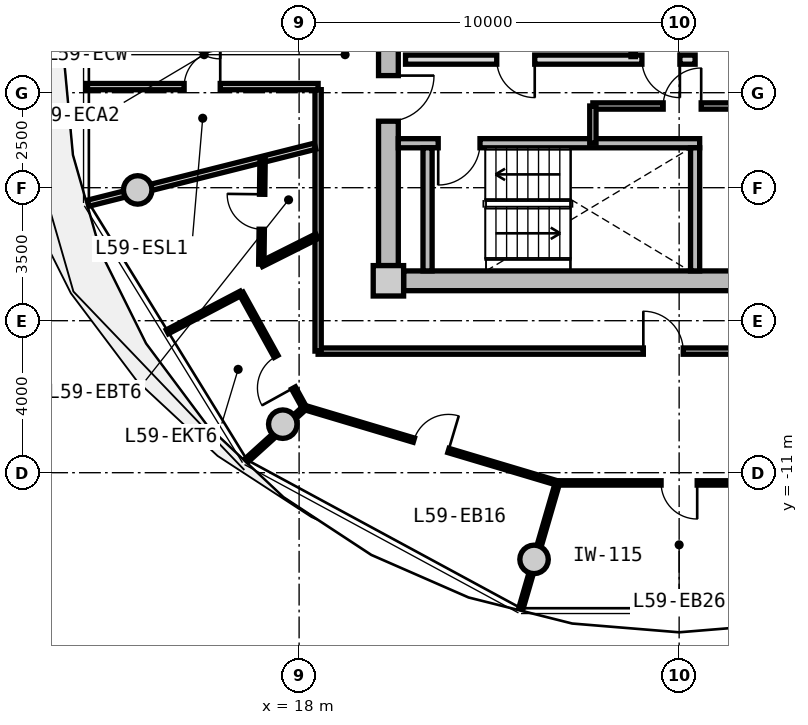
"""IFC4 building model, lengths in metres.
Left out: names, types, materials, properties, quantities, classifications, styles, units other than length and angle.
Written with IfcOpenShell. Run it as: python <this file> out.ifc"""

import sys

from ifc_helpers import new_model, si_unit, direction, frame, frame_2d, origin, origin_2d, place, context, subcontext, project, spatial, rectangle, circle, extrude, source, transform, mapped, element, fill, save


model = new_model("IFC4")
c1 = context("Model", 3, precision=1e-05, world=origin(), true_north=direction((0.0, 1.0)))
c2 = subcontext(c1, "Body", "Model", "MODEL_VIEW")
j1 = project(units=[si_unit("LENGTHUNIT", "METRE"), si_unit("PLANEANGLEUNIT", "RADIAN")], contexts=[c1])
p1 = place(None, origin())
s1 = spatial("IfcSite", under=j1, at=p1, CompositionType="ELEMENT")
p2 = place(p1, origin())
s2 = spatial("IfcBuilding", under=s1, at=p2, CompositionType="ELEMENT")
p3 = place(p2, frame((0.0, 0.0, 190.65)))
s3 = spatial("IfcBuildingStorey", under=s2, at=p3, CompositionType="ELEMENT", Elevation=190.65)
m1 = source(origin(), c2, "Body", "SweptSolid", [
    extrude(rectangle(XDim=0.8, YDim=0.8, at=origin_2d()), origin(), (0.0, 0.0, 1.0), 3.05),
])
p4 = place(p3, frame((20.35, -5.95, 0.0), z_axis=(0.0, 0.0, 1.0), x_axis=(1.0, 0.0, 0.0)))
e1 = element("IfcColumn", 1, at=p4, inside=s3, PredefinedType="COLUMN", context=c2, shape_type="MappedRepresentation", body=[
    mapped(m1, transform((0.0, 0.0, 0.0), x_axis=(1.0, 0.0, 0.0), y_axis=(0.0, 1.0, 0.0), z_axis=(0.0, 0.0, 1.0), scale=1.0)),
])
m2 = source(origin(), c2, "Body", "SweptSolid", [
    extrude(rectangle(XDim=14.5, YDim=0.52, at=frame_2d((7.25, 0.0))), origin(), (0.0, 0.0, 1.0), 2.81),
])
p5 = place(p3, frame((35.25, -5.95, 0.0), z_axis=(0.0, 0.0, 1.0), x_axis=(-1.0, 0.0, 0.0)))
e2 = element("IfcWall", 2, at=p5, inside=s3, PredefinedType="SHEAR", context=c2, shape_type="MappedRepresentation", body=[
    mapped(m2, transform((0.0, 0.0, 0.0), x_axis=(1.0, 0.0, 0.0), y_axis=(0.0, 1.0, 0.0), z_axis=(0.0, 0.0, 1.0), scale=1.0)),
])
m3 = source(origin(), c2, "Body", "SweptSolid", [
    extrude(rectangle(XDim=11.1, YDim=0.52, at=frame_2d((5.55, 0.0))), origin(), (0.0, 0.0, 1.0), 2.81),
])
p6 = place(p3, frame((20.35, -5.55, 0.0), z_axis=(0.0, 0.0, 1.0), x_axis=(0.0, 1.0, 0.0)))
e3 = element("IfcWall", 3, at=p6, inside=s3, PredefinedType="SHEAR", context=c2, shape_type="MappedRepresentation", body=[
    mapped(m3, transform((0.0, 0.0, 0.0), x_axis=(1.0, 0.0, 0.0), y_axis=(0.0, 1.0, 0.0), z_axis=(0.0, 0.0, 1.0), scale=1.0)),
])
p7 = place(p6, frame((3.8, 0.0, 0.0)))
e4 = element("IfcOpeningElement", 4, at=p7, cuts=e3, PredefinedType="OPENING", context=c2, shape_type="SweptSolid", body=[
    extrude(rectangle(XDim=1.2, YDim=2.15, at=frame_2d((0.6, 1.075))), frame((0.0, 0.27, 0.0), z_axis=(0.0, -1.0, 0.0), x_axis=(1.0, 0.0, 0.0)), (0.0, 0.0, 1.0), 0.54),
])
m4 = source(origin(), c2, "Body", "SweptSolid", [
    extrude(circle(Radius=0.375, at=origin_2d()), origin(), (0.0, 0.0, 1.0), 3.47),
])
for number, where, z_axis, x_axis in (
    (5, (13.753, -3.559, -0.42), (0.0, 0.0, 1.0), (1.0, 0.0, 0.0)),
    (6, (17.57, -9.723, -0.42), (0.0, 0.0, 1.0), (1.0, 0.0, 0.0)),
    (7, (24.182, -13.281, -0.42), (0.0, 0.0, 1.0), (1.0, 0.0, 0.0)),
):
    element("IfcColumn", number, at=place(p3, frame(where, z_axis=z_axis, x_axis=x_axis)), inside=s3, PredefinedType="COLUMN", context=c2, shape_type="MappedRepresentation", body=[
        mapped(m4, transform((0.0, 0.0, 0.0), x_axis=(1.0, 0.0, 0.0), y_axis=(0.0, 1.0, 0.0), z_axis=(0.0, 0.0, 1.0), scale=1.0)),
    ])
m5 = source(origin(), c2, "Body", "SweptSolid", [
    extrude(rectangle(XDim=7.93, YDim=0.24, at=frame_2d((3.965, 0.0))), origin(), (0.0, 0.0, 1.0), 2.81),
])
p8 = place(p3, frame((20.61, -2.33, 0.0), z_axis=(0.0, 0.0, 1.0), x_axis=(1.0, 0.0, 0.0)))
e8 = element("IfcWall", 8, at=p8, inside=s3, PredefinedType="PARTITIONING", context=c2, shape_type="MappedRepresentation", body=[
    mapped(m5, transform((0.0, 0.0, 0.0), x_axis=(1.0, 0.0, 0.0), y_axis=(0.0, 1.0, 0.0), z_axis=(0.0, 0.0, 1.0), scale=1.0)),
])
p9 = place(p8, frame((1.05, 0.0, 0.0)))
e9 = element("IfcOpeningElement", 9, at=p9, cuts=e8, PredefinedType="OPENING", context=c2, shape_type="SweptSolid", body=[
    extrude(rectangle(XDim=1.1, YDim=2.15, at=frame_2d((0.55, 1.075))), frame((0.0, 0.13, 0.0), z_axis=(0.0, -1.0, 0.0), x_axis=(1.0, 0.0, 0.0)), (0.0, 0.0, 1.0), 0.26),
])
m6 = source(origin(), c2, "Body", "SweptSolid", [
    extrude(rectangle(XDim=3.24, YDim=0.24, at=frame_2d((1.62, 0.0))), origin(), (0.0, 0.0, 1.0), 2.81),
])
for number, where, z_axis, x_axis in (
    (10, (21.38, -5.69, 0.0), (0.0, 0.0, 1.0), (0.0, 1.0, 0.0)),
    (11, (28.42, -5.69, 0.0), (0.0, 0.0, 1.0), (0.0, 1.0, 0.0)),
):
    element("IfcWall", number, at=place(p3, frame(where, z_axis=z_axis, x_axis=x_axis)), inside=s3, PredefinedType="PARTITIONING", context=c2, shape_type="MappedRepresentation", body=[
        mapped(m6, transform((0.0, 0.0, 0.0), x_axis=(1.0, 0.0, 0.0), y_axis=(0.0, 1.0, 0.0), z_axis=(0.0, 0.0, 1.0), scale=1.0)),
    ])
m7 = source(origin(), c2, "Body", "SweptSolid", [
    extrude(rectangle(XDim=7.62, YDim=0.24, at=frame_2d((3.81, 0.0))), origin(), (0.0, 0.0, 1.0), 2.795),
])
p10 = place(p3, frame((20.8, -0.13, 0.0), z_axis=(0.0, 0.0, 1.0), x_axis=(1.0, 0.0, 0.0)))
e12 = element("IfcWall", 12, at=p10, inside=s3, PredefinedType="PARTITIONING", context=c2, shape_type="MappedRepresentation", body=[
    mapped(m7, transform((0.0, 0.0, 0.0), x_axis=(1.0, 0.0, 0.0), y_axis=(0.0, 1.0, 0.0), z_axis=(0.0, 0.0, 1.0), scale=1.0)),
])
p11 = place(p10, frame((6.22, 0.0, 0.0)))
e13 = element("IfcOpeningElement", 13, at=p11, cuts=e12, PredefinedType="OPENING", context=c2, shape_type="SweptSolid", body=[
    extrude(rectangle(XDim=1.0, YDim=2.1, at=frame_2d((0.5, 1.05))), frame((0.0, 0.13, 0.0), z_axis=(0.0, -1.0, 0.0), x_axis=(1.0, 0.0, 0.0)), (0.0, 0.0, 1.0), 0.26),
])
p12 = place(p10, frame((2.4, 0.0, 0.0)))
e14 = element("IfcOpeningElement", 14, at=p12, cuts=e12, PredefinedType="OPENING", context=c2, shape_type="SweptSolid", body=[
    extrude(rectangle(XDim=1.0, YDim=2.1, at=frame_2d((0.5, 1.05))), frame((0.0, 0.13, 0.0), z_axis=(0.0, -1.0, 0.0), x_axis=(1.0, 0.0, 0.0)), (0.0, 0.0, 1.0), 0.26),
])
m8 = source(origin(), c2, "Body", "SweptSolid", [
    extrude(rectangle(XDim=2.33, YDim=0.115, at=frame_2d((1.165, 0.0))), origin(), (0.0, 0.0, 1.0), 2.795),
])
p13 = place(p3, frame((26.79, -0.05, 0.0), z_axis=(0.0, 0.0, 1.0), x_axis=(0.0, 1.0, 0.0)))
e15 = element("IfcWall", 15, at=p13, inside=s3, PredefinedType="PARTITIONING", context=c2, shape_type="MappedRepresentation", body=[
    mapped(m8, transform((0.0, 0.0, 0.0), x_axis=(1.0, 0.0, 0.0), y_axis=(0.0, 1.0, 0.0), z_axis=(0.0, 0.0, 1.0), scale=1.0)),
])
m9 = source(origin(), c2, "Body", "SweptSolid", [
    extrude(rectangle(XDim=4.77, YDim=0.165, at=frame_2d((2.385, 0.0))), origin(), (0.0, 0.0, 1.0), 2.795),
])
p14 = place(p3, frame((25.73, -1.35, 0.0), z_axis=(0.0, 0.0, 1.0), x_axis=(1.0, 0.0, 0.0)))
e16 = element("IfcWall", 16, at=p14, inside=s3, PredefinedType="PARTITIONING", context=c2, shape_type="MappedRepresentation", body=[
    mapped(m9, transform((0.0, 0.0, 0.0), x_axis=(1.0, 0.0, 0.0), y_axis=(0.0, 1.0, 0.0), z_axis=(0.0, 0.0, 1.0), scale=1.0)),
])
p15 = place(p14, frame((1.85, 0.0, 0.0)))
e17 = element("IfcOpeningElement", 17, at=p15, cuts=e16, PredefinedType="OPENING", context=c2, shape_type="SweptSolid", body=[
    extrude(rectangle(XDim=1.0, YDim=2.1, at=frame_2d((0.5, 1.05))), frame((0.0, 0.093, 0.0), z_axis=(0.0, -1.0, 0.0), x_axis=(1.0, 0.0, 0.0)), (0.0, 0.0, 1.0), 0.185),
])
m10 = source(origin(), c2, "Body", "SweptSolid", [
    extrude(rectangle(XDim=0.98, YDim=0.165, at=frame_2d((0.49, 0.0))), origin(), (0.0, 0.0, 1.0), 2.795),
])
p16 = place(p3, frame((25.73, -2.33, 0.0), z_axis=(0.0, 0.0, 1.0), x_axis=(0.0, 1.0, 0.0)))
e18 = element("IfcWall", 18, at=p16, inside=s3, PredefinedType="PARTITIONING", context=c2, shape_type="MappedRepresentation", body=[
    mapped(m10, transform((0.0, 0.0, 0.0), x_axis=(1.0, 0.0, 0.0), y_axis=(0.0, 1.0, 0.0), z_axis=(0.0, 0.0, 1.0), scale=1.0)),
])
m11 = source(origin(), c2, "Body", "SweptSolid", [
    extrude(rectangle(XDim=19.0, YDim=0.165, at=frame_2d((9.5, 0.0))), origin(), (0.0, 0.0, 1.0), 2.795),
])
p17 = place(p3, frame((37.5, -7.8, 0.0), z_axis=(0.0, 0.0, 1.0), x_axis=(-1.0, 0.0, 0.0)))
e19 = element("IfcWall", 19, at=p17, inside=s3, PredefinedType="PARTITIONING", context=c2, shape_type="MappedRepresentation", body=[
    mapped(m11, transform((0.0, 0.0, 0.0), x_axis=(1.0, 0.0, 0.0), y_axis=(0.0, 1.0, 0.0), z_axis=(0.0, 0.0, 1.0), scale=1.0)),
])
p18 = place(p17, frame((9.392, 0.0, 0.0)))
e20 = element("IfcOpeningElement", 20, at=p18, cuts=e19, PredefinedType="OPENING", context=c2, shape_type="SweptSolid", body=[
    extrude(rectangle(XDim=1.05, YDim=2.15, at=frame_2d((0.525, 1.075))), frame((0.0, 0.093, 0.0), z_axis=(0.0, -1.0, 0.0), x_axis=(1.0, 0.0, 0.0)), (0.0, 0.0, 1.0), 0.185),
])
m12 = source(origin(), c2, "Body", "SweptSolid", [
    extrude(rectangle(XDim=6.88, YDim=0.165, at=frame_2d((3.44, 0.0))), origin(), (0.0, 0.0, 1.0), 2.795),
])
p19 = place(p3, frame((18.5, -7.8, 0.0), z_axis=(0.0, 0.0, 1.0), x_axis=(0.0, 1.0, 0.0)))
e21 = element("IfcWall", 21, at=p19, inside=s3, PredefinedType="PARTITIONING", context=c2, shape_type="MappedRepresentation", body=[
    mapped(m12, transform((0.0, 0.0, 0.0), x_axis=(1.0, 0.0, 0.0), y_axis=(0.0, 1.0, 0.0), z_axis=(0.0, 0.0, 1.0), scale=1.0)),
])
m13 = source(origin(), c2, "Body", "SweptSolid", [
    extrude(rectangle(XDim=6.157, YDim=0.165, at=frame_2d((3.079, 0.0))), origin(), (0.0, 0.0, 1.0), 2.395),
])
p20 = place(p3, frame((18.42, -2.407, 0.0), z_axis=(0.0, 0.0, 1.0), x_axis=(-0.969840867184, -0.243738984038, 0.0)))
e22 = element("IfcWall", 22, at=p20, inside=s3, PredefinedType="PARTITIONING", context=c2, shape_type="MappedRepresentation", body=[
    mapped(m13, transform((0.0, 0.0, 0.0), x_axis=(1.0, 0.0, 0.0), y_axis=(0.0, 1.0, 0.0), z_axis=(0.0, 0.0, 1.0), scale=1.0)),
])
m14 = source(origin(), c2, "Body", "SweptSolid", [
    extrude(rectangle(XDim=6.101, YDim=0.165, at=frame_2d((3.051, 0.0))), origin(), (0.0, 0.0, 1.0), 2.795),
])
p21 = place(p3, frame((18.5, -0.84, 0.0), z_axis=(0.0, 0.0, 1.0), x_axis=(-1.0, 0.0, 0.0)))
e23 = element("IfcWall", 23, at=p21, inside=s3, PredefinedType="PARTITIONING", context=c2, shape_type="MappedRepresentation", body=[
    mapped(m14, transform((0.0, 0.0, 0.0), x_axis=(1.0, 0.0, 0.0), y_axis=(0.0, 1.0, 0.0), z_axis=(0.0, 0.0, 1.0), scale=1.0)),
])
p22 = place(p21, frame((2.576, 0.0, 0.0)))
e24 = element("IfcOpeningElement", 24, at=p22, cuts=e23, PredefinedType="OPENING", context=c2, shape_type="SweptSolid", body=[
    extrude(rectangle(XDim=0.95, YDim=2.1, at=frame_2d((0.475, 1.05))), frame((0.0, 0.093, 0.0), z_axis=(0.0, -1.0, 0.0), x_axis=(1.0, 0.0, 0.0)), (0.0, 0.0, 1.0), 0.185),
])
m15 = source(origin(), c2, "Body", "SweptSolid", [
    extrude(rectangle(XDim=6.936, YDim=0.115, at=frame_2d((3.468, 0.0))), origin(), (0.0, 0.0, 1.0), 2.795),
])
p23 = place(p3, frame((18.151, -9.287, 0.0), z_axis=(0.0, 0.0, 1.0), x_axis=(0.958186895835, -0.286143098205, 0.0)))
e25 = element("IfcWall", 25, at=p23, inside=s3, PredefinedType="PARTITIONING", context=c2, shape_type="MappedRepresentation", body=[
    mapped(m15, transform((0.0, 0.0, 0.0), x_axis=(1.0, 0.0, 0.0), y_axis=(0.0, 1.0, 0.0), z_axis=(0.0, 0.0, 1.0), scale=1.0)),
])
p24 = place(p23, frame((2.993, 0.0, 0.0)))
e26 = element("IfcOpeningElement", 26, at=p24, cuts=e25, PredefinedType="OPENING", context=c2, shape_type="SweptSolid", body=[
    extrude(rectangle(XDim=0.95, YDim=2.1, at=frame_2d((0.475, 1.05))), frame((0.0, 0.067, 0.0), z_axis=(0.0, -1.0, 0.0), x_axis=(1.0, 0.0, 0.0)), (0.0, 0.0, 1.0), 0.135),
])
m16 = source(origin(), c2, "Body", "SweptSolid", [
    extrude(rectangle(XDim=2.072, YDim=0.115, at=frame_2d((1.036, 0.0))), origin(), (0.0, 0.0, 1.0), 2.395),
])
p25 = place(p3, frame((18.151, -9.287, 0.0), z_axis=(0.0, 0.0, 1.0), x_axis=(-0.741410125356, -0.671052178314, 0.0)))
e27 = element("IfcWall", 27, at=p25, inside=s3, PredefinedType="PARTITIONING", context=c2, shape_type="MappedRepresentation", body=[
    mapped(m16, transform((0.0, 0.0, 0.0), x_axis=(1.0, 0.0, 0.0), y_axis=(0.0, 1.0, 0.0), z_axis=(0.0, 0.0, 1.0), scale=1.0)),
])
m17 = source(origin(), c2, "Body", "SweptSolid", [
    extrude(rectangle(XDim=6.404, YDim=0.115, at=frame_2d((3.202, 0.0))), origin(), (0.0, 0.0, 1.0), 2.795),
])
p26 = place(p3, frame((24.798, -11.269, 0.0), z_axis=(0.0, 0.0, 1.0), x_axis=(1.0, 0.0, 0.0)))
e28 = element("IfcWall", 28, at=p26, inside=s3, PredefinedType="PARTITIONING", context=c2, shape_type="MappedRepresentation", body=[
    mapped(m17, transform((0.0, 0.0, 0.0), x_axis=(1.0, 0.0, 0.0), y_axis=(0.0, 1.0, 0.0), z_axis=(0.0, 0.0, 1.0), scale=1.0)),
])
p27 = place(p26, frame((2.727, 0.0, 0.0)))
e29 = element("IfcOpeningElement", 29, at=p27, cuts=e28, PredefinedType="OPENING", context=c2, shape_type="SweptSolid", body=[
    extrude(rectangle(XDim=0.95, YDim=2.1, at=frame_2d((0.475, 1.05))), frame((0.0, 0.067, 0.0), z_axis=(0.0, -1.0, 0.0), x_axis=(1.0, 0.0, 0.0)), (0.0, 0.0, 1.0), 0.135),
])
m18 = source(origin(), c2, "Body", "SweptSolid", [
    extrude(rectangle(XDim=3.454, YDim=0.115, at=frame_2d((1.727, 0.0))), origin(), (0.0, 0.0, 1.0), 2.395),
])
p28 = place(p3, frame((24.798, -11.269, 0.0), z_axis=(0.0, 0.0, 1.0), x_axis=(-0.279348499358, -0.960189781193, 0.0)))
e30 = element("IfcWall", 30, at=p28, inside=s3, PredefinedType="PARTITIONING", context=c2, shape_type="MappedRepresentation", body=[
    mapped(m18, transform((0.0, 0.0, 0.0), x_axis=(1.0, 0.0, 0.0), y_axis=(0.0, 1.0, 0.0), z_axis=(0.0, 0.0, 1.0), scale=1.0)),
])
m19 = source(origin(), c2, "Body", "SweptSolid", [
    extrude(rectangle(XDim=1.638, YDim=0.14, at=frame_2d((0.819, 0.0))), origin(), (0.0, 0.0, 1.0), 2.795),
])
p29 = place(p3, frame((18.47, -4.778, 0.0), z_axis=(0.0, 0.0, 1.0), x_axis=(-0.893919977945, -0.448226586707, 0.0)))
e31 = element("IfcWall", 31, at=p29, inside=s3, PredefinedType="PARTITIONING", context=c2, shape_type="MappedRepresentation", body=[
    mapped(m19, transform((0.0, 0.0, 0.0), x_axis=(1.0, 0.0, 0.0), y_axis=(0.0, 1.0, 0.0), z_axis=(0.0, 0.0, 1.0), scale=1.0)),
])
m20 = source(origin(), c2, "Body", "SweptSolid", [
    extrude(rectangle(XDim=2.759, YDim=0.14, at=frame_2d((1.379, 0.0))), origin(), (0.0, 0.0, 1.0), 2.795),
])
p30 = place(p3, frame((17.005, -5.513, 0.0), z_axis=(0.0, 0.0, 1.0), x_axis=(0.01194710728, 0.999928630767, 0.0)))
e32 = element("IfcWall", 32, at=p30, inside=s3, PredefinedType="PARTITIONING", context=c2, shape_type="MappedRepresentation", body=[
    mapped(m20, transform((0.0, 0.0, 0.0), x_axis=(1.0, 0.0, 0.0), y_axis=(0.0, 1.0, 0.0), z_axis=(0.0, 0.0, 1.0), scale=1.0)),
])
p31 = place(p30, frame((0.919, 0.0, 0.0)))
e33 = element("IfcOpeningElement", 33, at=p31, cuts=e32, PredefinedType="OPENING", context=c2, shape_type="SweptSolid", body=[
    extrude(rectangle(XDim=0.92, YDim=2.1, at=frame_2d((0.46, 1.05))), frame((0.0, 0.08, 0.0), z_axis=(0.0, -1.0, 0.0), x_axis=(1.0, 0.0, 0.0)), (0.0, 0.0, 1.0), 0.16),
])
m21 = source(origin(), c2, "Body", "SweptSolid", [
    extrude(rectangle(XDim=2.193, YDim=0.115, at=frame_2d((1.097, 0.0))), origin(), (0.0, 0.0, 1.0), 2.795),
])
p32 = place(p3, frame((16.475, -6.275, 0.0), z_axis=(0.0, 0.0, 1.0), x_axis=(-0.885783595046, -0.464098505435, 0.0)))
e34 = element("IfcWall", 34, at=p32, inside=s3, PredefinedType="PARTITIONING", context=c2, shape_type="MappedRepresentation", body=[
    mapped(m21, transform((0.0, 0.0, 0.0), x_axis=(1.0, 0.0, 0.0), y_axis=(0.0, 1.0, 0.0), z_axis=(0.0, 0.0, 1.0), scale=1.0)),
])
m22 = source(origin(), c2, "Body", "SweptSolid", [
    extrude(rectangle(XDim=3.45, YDim=0.115, at=frame_2d((1.725, 0.0))), origin(), (0.0, 0.0, 1.0), 2.795),
])
p33 = place(p3, frame((16.475, -6.275, 0.0), z_axis=(0.0, 0.0, 1.0), x_axis=(0.483659007882, -0.875256513312, 0.0)))
e35 = element("IfcWall", 35, at=p33, inside=s3, PredefinedType="PARTITIONING", context=c2, shape_type="MappedRepresentation", body=[
    mapped(m22, transform((0.0, 0.0, 0.0), x_axis=(1.0, 0.0, 0.0), y_axis=(0.0, 1.0, 0.0), z_axis=(0.0, 0.0, 1.0), scale=1.0)),
])
p34 = place(p33, frame((1.9, 0.0, 0.0)))
e36 = element("IfcOpeningElement", 36, at=p34, cuts=e35, PredefinedType="OPENING", context=c2, shape_type="SweptSolid", body=[
    extrude(rectangle(XDim=0.95, YDim=2.1, at=frame_2d((0.475, 1.05))), frame((0.0, 0.067, 0.0), z_axis=(0.0, -1.0, 0.0), x_axis=(1.0, 0.0, 0.0)), (0.0, 0.0, 1.0), 0.135),
])
m23 = source(origin(), c2, "Body", "SweptSolid", [
    extrude(rectangle(XDim=1.1, YDim=2.15, at=frame_2d((0.55, 1.075))), frame((0.0, 0.025, 0.0), z_axis=(0.0, -1.0, 0.0), x_axis=(1.0, 0.0, 0.0)), (0.0, 0.0, 1.0), 0.05),
])
p35 = place(p9, frame((1.1, 0.0, 0.0), z_axis=(0.0, 0.0, 1.0), x_axis=(-1.0, 0.0, 0.0)))
e37 = element("IfcDoor", 37, at=p35, inside=s3, OperationType="SINGLE_SWING_RIGHT", PredefinedType="DOOR", context=c2, shape_type="MappedRepresentation", body=[
    mapped(m23, transform((0.0, 0.0, 0.0), x_axis=(1.0, 0.0, 0.0), y_axis=(0.0, 1.0, 0.0), z_axis=(0.0, 0.0, 1.0), scale=1.0)),
])
fill(e9, e37)
m24 = source(origin(), c2, "Body", "SweptSolid", [
    extrude(rectangle(XDim=1.2, YDim=2.15, at=frame_2d((0.6, 1.075))), frame((0.0, 0.025, 0.0), z_axis=(0.0, -1.0, 0.0), x_axis=(1.0, 0.0, 0.0)), (0.0, 0.0, 1.0), 0.05),
])
p36 = place(p7, frame((1.2, 0.0, 0.0), z_axis=(0.0, 0.0, 1.0), x_axis=(-1.0, 0.0, 0.0)))
e38 = element("IfcDoor", 38, at=p36, inside=s3, OperationType="SINGLE_SWING_LEFT", PredefinedType="DOOR", context=c2, shape_type="MappedRepresentation", body=[
    mapped(m24, transform((0.0, 0.0, 0.0), x_axis=(1.0, 0.0, 0.0), y_axis=(0.0, 1.0, 0.0), z_axis=(0.0, 0.0, 1.0), scale=1.0)),
])
fill(e4, e38)
m25 = source(origin(), c2, "Body", "SweptSolid", [
    extrude(rectangle(XDim=1.0, YDim=2.1, at=frame_2d((0.5, 1.05))), frame((0.0, 0.025, 0.0), z_axis=(0.0, -1.0, 0.0), x_axis=(1.0, 0.0, 0.0)), (0.0, 0.0, 1.0), 0.05),
])
p37 = place(p11, frame((1.0, 0.0, 0.0), z_axis=(0.0, 0.0, 1.0), x_axis=(-1.0, 0.0, 0.0)))
e39 = element("IfcDoor", 39, at=p37, inside=s3, OperationType="SINGLE_SWING_LEFT", PredefinedType="DOOR", context=c2, shape_type="MappedRepresentation", body=[
    mapped(m25, transform((0.0, 0.0, 0.0), x_axis=(1.0, 0.0, 0.0), y_axis=(0.0, 1.0, 0.0), z_axis=(0.0, 0.0, 1.0), scale=1.0)),
])
fill(e13, e39)
p38 = place(p12, frame((1.0, 0.0, 0.0), z_axis=(0.0, 0.0, 1.0), x_axis=(-1.0, 0.0, 0.0)))
e40 = element("IfcDoor", 40, at=p38, inside=s3, OperationType="SINGLE_SWING_LEFT", PredefinedType="DOOR", context=c2, shape_type="MappedRepresentation", body=[
    mapped(m25, transform((0.0, 0.0, 0.0), x_axis=(1.0, 0.0, 0.0), y_axis=(0.0, 1.0, 0.0), z_axis=(0.0, 0.0, 1.0), scale=1.0)),
])
fill(e14, e40)
p39 = place(p15, origin())
e41 = element("IfcDoor", 41, at=p39, inside=s3, OperationType="SINGLE_SWING_RIGHT", PredefinedType="DOOR", context=c2, shape_type="MappedRepresentation", body=[
    mapped(m25, transform((0.0, 0.0, 0.0), x_axis=(1.0, 0.0, 0.0), y_axis=(0.0, 1.0, 0.0), z_axis=(0.0, 0.0, 1.0), scale=1.0)),
])
fill(e17, e41)
m26 = source(origin(), c2, "Body", "SweptSolid", [
    extrude(rectangle(XDim=0.95, YDim=2.1, at=frame_2d((0.475, 1.05))), frame((0.0, 0.025, 0.0), z_axis=(0.0, -1.0, 0.0), x_axis=(1.0, 0.0, 0.0)), (0.0, 0.0, 1.0), 0.05),
])
p40 = place(p22, frame((0.95, 0.0, 0.0), z_axis=(0.0, 0.0, 1.0), x_axis=(-1.0, 0.0, 0.0)))
e42 = element("IfcDoor", 42, at=p40, inside=s3, OperationType="SINGLE_SWING_RIGHT", PredefinedType="DOOR", context=c2, shape_type="MappedRepresentation", body=[
    mapped(m26, transform((0.0, 0.0, 0.0), x_axis=(1.0, 0.0, 0.0), y_axis=(0.0, 1.0, 0.0), z_axis=(0.0, 0.0, 1.0), scale=1.0)),
])
fill(e24, e42)
m27 = source(origin(), c2, "Body", "SweptSolid", [
    extrude(rectangle(XDim=1.05, YDim=2.15, at=frame_2d((0.525, 1.075))), frame((0.0, 0.025, 0.0), z_axis=(0.0, -1.0, 0.0), x_axis=(1.0, 0.0, 0.0)), (0.0, 0.0, 1.0), 0.05),
])
p41 = place(p18, frame((1.05, 0.0, 0.0), z_axis=(0.0, 0.0, 1.0), x_axis=(-1.0, 0.0, 0.0)))
e43 = element("IfcDoor", 43, at=p41, inside=s3, OperationType="SINGLE_SWING_LEFT", PredefinedType="DOOR", context=c2, shape_type="MappedRepresentation", body=[
    mapped(m27, transform((0.0, 0.0, 0.0), x_axis=(1.0, 0.0, 0.0), y_axis=(0.0, 1.0, 0.0), z_axis=(0.0, 0.0, 1.0), scale=1.0)),
])
fill(e20, e43)
m28 = source(origin(), c2, "Body", "SweptSolid", [
    extrude(rectangle(XDim=0.92, YDim=2.1, at=frame_2d((0.46, 1.05))), frame((0.0, 0.025, 0.0), z_axis=(0.0, -1.0, 0.0), x_axis=(1.0, 0.0, 0.0)), (0.0, 0.0, 1.0), 0.05),
])
p42 = place(p31, origin())
e44 = element("IfcDoor", 44, at=p42, inside=s3, OperationType="SINGLE_SWING_RIGHT", PredefinedType="DOOR", context=c2, shape_type="MappedRepresentation", body=[
    mapped(m28, transform((0.0, 0.0, 0.0), x_axis=(1.0, 0.0, 0.0), y_axis=(0.0, 1.0, 0.0), z_axis=(0.0, 0.0, 1.0), scale=1.0)),
])
fill(e33, e44)
p43 = place(p34, frame((0.95, 0.0, 0.0), z_axis=(0.0, 0.0, 1.0), x_axis=(-1.0, 0.0, 0.0)))
e45 = element("IfcDoor", 45, at=p43, inside=s3, OperationType="SINGLE_SWING_LEFT", PredefinedType="DOOR", context=c2, shape_type="MappedRepresentation", body=[
    mapped(m26, transform((0.0, 0.0, 0.0), x_axis=(1.0, 0.0, 0.0), y_axis=(0.0, 1.0, 0.0), z_axis=(0.0, 0.0, 1.0), scale=1.0)),
])
fill(e36, e45)
p44 = place(p24, origin())
e46 = element("IfcDoor", 46, at=p44, inside=s3, OperationType="SINGLE_SWING_RIGHT", PredefinedType="DOOR", context=c2, shape_type="MappedRepresentation", body=[
    mapped(m26, transform((0.0, 0.0, 0.0), x_axis=(1.0, 0.0, 0.0), y_axis=(0.0, 1.0, 0.0), z_axis=(0.0, 0.0, 1.0), scale=1.0)),
])
fill(e26, e46)
p45 = place(p27, frame((0.95, 0.0, 0.0), z_axis=(0.0, 0.0, 1.0), x_axis=(-1.0, 0.0, 0.0)))
e47 = element("IfcDoor", 47, at=p45, inside=s3, OperationType="SINGLE_SWING_LEFT", PredefinedType="DOOR", context=c2, shape_type="MappedRepresentation", body=[
    mapped(m26, transform((0.0, 0.0, 0.0), x_axis=(1.0, 0.0, 0.0), y_axis=(0.0, 1.0, 0.0), z_axis=(0.0, 0.0, 1.0), scale=1.0)),
])
fill(e29, e47)
save(model, sys.argv[1])
